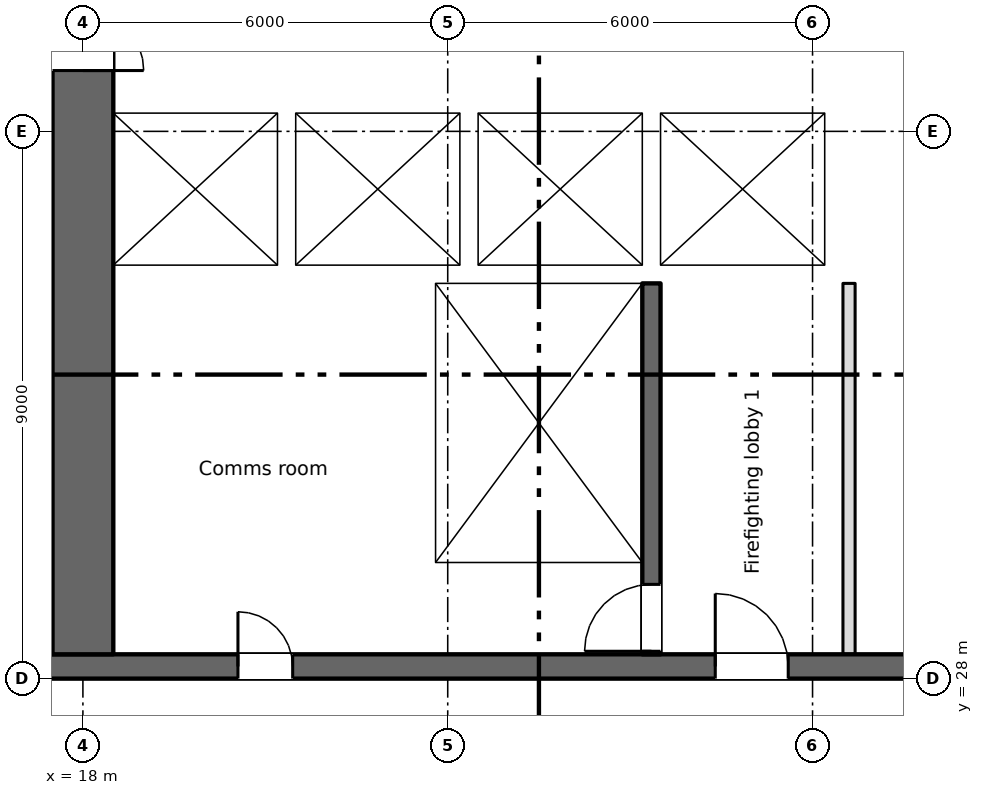
"""IFC4 building model, lengths in metres.
Left out: names, types, materials, properties, quantities, classifications, styles, units other than length and angle.
Written with IfcOpenShell. Run it as: python <this file> out.ifc"""

import sys

from ifc_helpers import new_model, si_unit, direction, frame, frame_2d, origin, place, context, subcontext, project, spatial, rectangle, extrude, element, fill, save


model = new_model("IFC4")
c1 = context("Model", 3, precision=1e-05, world=origin(), true_north=direction((0.0, 1.0)))
c2 = subcontext(c1, "Body", "Model", "MODEL_VIEW")
j1 = project(units=[si_unit("LENGTHUNIT", "METRE"), si_unit("PLANEANGLEUNIT", "RADIAN")], contexts=[c1])
p1 = place(None, origin())
s1 = spatial("IfcSite", under=j1, at=p1, CompositionType="ELEMENT")
p2 = place(p1, origin())
s2 = spatial("IfcBuilding", under=s1, at=p2, CompositionType="ELEMENT")
p3 = place(p2, frame((0.0, 0.0, 52.5)))
s3 = spatial("IfcBuildingStorey", under=s2, at=p3, CompositionType="ELEMENT", Elevation=52.5)
p4 = place(p3, frame((6.7, 28.2, 0.0), z_axis=(0.0, 0.0, 1.0), x_axis=(1.0, 0.0, 0.0)))
e1 = element("IfcWall", 1, at=p4, inside=s3, PredefinedType="SHEAR", context=c2, shape_type="SweptSolid", body=[
    extrude(rectangle(XDim=57.8, YDim=0.4, at=frame_2d((28.9, 0.0))), origin(), (0.0, 0.0, 1.0), 3.35),
])
p5 = place(p4, frame((13.85, 0.0, 0.0)))
e2 = element("IfcOpeningElement", 2, at=p5, cuts=e1, PredefinedType="OPENING", context=c2, shape_type="SweptSolid", body=[
    extrude(rectangle(XDim=0.9, YDim=2.1, at=frame_2d((0.45, 1.05))), frame((0.0, 0.21, 0.0), z_axis=(0.0, -1.0, 0.0), x_axis=(1.0, 0.0, 0.0)), (0.0, 0.0, 1.0), 0.42),
])
p6 = place(p4, frame((48.562, 0.0, 0.0)))
e3 = element("IfcOpeningElement", 3, at=p6, cuts=e1, PredefinedType="OPENING", context=c2, shape_type="SweptSolid", body=[
    extrude(rectangle(XDim=0.9, YDim=2.1, at=frame_2d((0.45, 1.05))), frame((0.0, 0.21, 0.0), z_axis=(0.0, -1.0, 0.0), x_axis=(1.0, 0.0, 0.0)), (0.0, 0.0, 1.0), 0.42),
])
p7 = place(p4, frame((51.137, 0.0, 0.0)))
e4 = element("IfcOpeningElement", 4, at=p7, cuts=e1, PredefinedType="OPENING", context=c2, shape_type="SweptSolid", body=[
    extrude(rectangle(XDim=0.9, YDim=2.1, at=frame_2d((0.45, 1.05))), frame((0.0, 0.21, 0.0), z_axis=(0.0, -1.0, 0.0), x_axis=(1.0, 0.0, 0.0)), (0.0, 0.0, 1.0), 0.42),
])
p8 = place(p4, frame((1.35, 0.0, 0.0)))
e5 = element("IfcOpeningElement", 5, at=p8, cuts=e1, PredefinedType="OPENING", context=c2, shape_type="SweptSolid", body=[
    extrude(rectangle(XDim=0.9, YDim=2.1, at=frame_2d((0.45, 1.05))), frame((0.0, 0.21, 0.0), z_axis=(0.0, -1.0, 0.0), x_axis=(1.0, 0.0, 0.0)), (0.0, 0.0, 1.0), 0.42),
])
p9 = place(p4, frame((4.7, 0.0, 0.0)))
e6 = element("IfcOpeningElement", 6, at=p9, cuts=e1, PredefinedType="OPENING", context=c2, shape_type="SweptSolid", body=[
    extrude(rectangle(XDim=1.2, YDim=2.1, at=frame_2d((0.6, 1.05))), frame((0.0, 0.21, 0.0), z_axis=(0.0, -1.0, 0.0), x_axis=(1.0, 0.0, 0.0)), (0.0, 0.0, 1.0), 0.42),
])
p10 = place(p4, frame((31.7, 0.0, 0.0)))
e7 = element("IfcOpeningElement", 7, at=p10, cuts=e1, PredefinedType="OPENING", context=c2, shape_type="SweptSolid", body=[
    extrude(rectangle(XDim=1.2, YDim=2.1, at=frame_2d((0.6, 1.05))), frame((0.0, 0.21, 0.0), z_axis=(0.0, -1.0, 0.0), x_axis=(1.0, 0.0, 0.0)), (0.0, 0.0, 1.0), 0.42),
])
p11 = place(p4, frame((55.2, 0.0, 0.0)))
e8 = element("IfcOpeningElement", 8, at=p11, cuts=e1, PredefinedType="OPENING", context=c2, shape_type="SweptSolid", body=[
    extrude(rectangle(XDim=1.2, YDim=2.1, at=frame_2d((0.6, 1.05))), frame((0.0, 0.21, 0.0), z_axis=(0.0, -1.0, 0.0), x_axis=(1.0, 0.0, 0.0)), (0.0, 0.0, 1.0), 0.42),
])
p12 = place(p4, frame((21.7, 0.0, 0.0)))
e9 = element("IfcOpeningElement", 9, at=p12, cuts=e1, PredefinedType="OPENING", context=c2, shape_type="SweptSolid", body=[
    extrude(rectangle(XDim=1.2, YDim=2.1, at=frame_2d((0.6, 1.05))), frame((0.0, 0.21, 0.0), z_axis=(0.0, -1.0, 0.0), x_axis=(1.0, 0.0, 0.0)), (0.0, 0.0, 1.0), 0.42),
])
p13 = place(p4, frame((41.7, 0.0, 0.0)))
e10 = element("IfcOpeningElement", 10, at=p13, cuts=e1, PredefinedType="OPENING", context=c2, shape_type="SweptSolid", body=[
    extrude(rectangle(XDim=1.2, YDim=2.1, at=frame_2d((0.6, 1.05))), frame((0.0, 0.21, 0.0), z_axis=(0.0, -1.0, 0.0), x_axis=(1.0, 0.0, 0.0)), (0.0, 0.0, 1.0), 0.42),
])
p14 = place(p4, frame((24.85, 0.0, 0.0)))
e11 = element("IfcOpeningElement", 11, at=p14, cuts=e1, PredefinedType="OPENING", context=c2, shape_type="SweptSolid", body=[
    extrude(rectangle(XDim=2.4, YDim=2.1, at=frame_2d((1.2, 1.05))), frame((0.0, 0.21, 0.0), z_axis=(0.0, -1.0, 0.0), x_axis=(1.0, 0.0, 0.0)), (0.0, 0.0, 1.0), 0.42),
])
p15 = place(p4, frame((37.35, 0.0, 0.0)))
e12 = element("IfcOpeningElement", 12, at=p15, cuts=e1, PredefinedType="OPENING", context=c2, shape_type="SweptSolid", body=[
    extrude(rectangle(XDim=2.4, YDim=2.1, at=frame_2d((1.2, 1.05))), frame((0.0, 0.21, 0.0), z_axis=(0.0, -1.0, 0.0), x_axis=(1.0, 0.0, 0.0)), (0.0, 0.0, 1.0), 0.42),
])
p16 = place(p4, frame((7.85, 0.0, 0.0)))
e13 = element("IfcOpeningElement", 13, at=p16, cuts=e1, PredefinedType="OPENING", context=c2, shape_type="SweptSolid", body=[
    extrude(rectangle(XDim=2.4, YDim=2.1, at=frame_2d((1.2, 1.05))), frame((0.0, 0.21, 0.0), z_axis=(0.0, -1.0, 0.0), x_axis=(1.0, 0.0, 0.0)), (0.0, 0.0, 1.0), 0.42),
])
p17 = place(p4, frame((28.85, 0.0, 0.0)))
e14 = element("IfcOpeningElement", 14, at=p17, cuts=e1, PredefinedType="OPENING", context=c2, shape_type="SweptSolid", body=[
    extrude(rectangle(XDim=0.9, YDim=2.1, at=frame_2d((0.45, 1.05))), frame((0.0, 0.21, 0.0), z_axis=(0.0, -1.0, 0.0), x_axis=(1.0, 0.0, 0.0)), (0.0, 0.0, 1.0), 0.42),
])
p18 = place(p4, frame((34.85, 0.0, 0.0)))
e15 = element("IfcOpeningElement", 15, at=p18, cuts=e1, PredefinedType="OPENING", context=c2, shape_type="SweptSolid", body=[
    extrude(rectangle(XDim=0.9, YDim=2.1, at=frame_2d((0.45, 1.05))), frame((0.0, 0.21, 0.0), z_axis=(0.0, -1.0, 0.0), x_axis=(1.0, 0.0, 0.0)), (0.0, 0.0, 1.0), 0.42),
])
p19 = place(p3, frame((18.0, 28.4, 0.0), z_axis=(0.0, 0.0, 1.0), x_axis=(0.0, 1.0, 0.0)))
e16 = element("IfcWall", 16, at=p19, inside=s3, PredefinedType="SHEAR", context=c2, shape_type="SweptSolid", body=[
    extrude(rectangle(XDim=16.6, YDim=1.0, at=frame_2d((8.3, 0.0))), origin(), (0.0, 0.0, 1.0), 3.35),
])
p20 = place(p19, frame((9.6, 0.0, 0.0)))
e17 = element("IfcOpeningElement", 17, at=p20, cuts=e16, PredefinedType="OPENING", context=c2, shape_type="SweptSolid", body=[
    extrude(rectangle(XDim=2.0, YDim=2.1, at=frame_2d((1.0, 1.05))), frame((0.0, 0.51, 0.0), z_axis=(0.0, -1.0, 0.0), x_axis=(1.0, 0.0, 0.0)), (0.0, 0.0, 1.0), 1.02),
])
p21 = place(p19, frame((15.25, 0.0, 0.0)))
e18 = element("IfcOpeningElement", 18, at=p21, cuts=e16, PredefinedType="OPENING", context=c2, shape_type="SweptSolid", body=[
    extrude(rectangle(XDim=1.2, YDim=2.1, at=frame_2d((0.6, 1.05))), frame((0.0, 0.51, 0.0), z_axis=(0.0, -1.0, 0.0), x_axis=(1.0, 0.0, 0.0)), (0.0, 0.0, 1.0), 1.02),
])
p22 = place(p3, frame((23.65, 28.4, 0.0), z_axis=(0.0, 0.0, 1.0), x_axis=(0.0, 1.0, 0.0)))
e19 = element("IfcWall", 19, at=p22, inside=s3, PredefinedType="SHEAR", context=c2, shape_type="SweptSolid", body=[
    extrude(rectangle(XDim=6.1, YDim=0.3, at=frame_2d((3.05, 0.0))), origin(), (0.0, 0.0, 1.0), 3.35),
])
p23 = place(p3, frame((27.35, 28.4, 0.0), z_axis=(0.0, 0.0, 1.0), x_axis=(0.0, 1.0, 0.0)))
e20 = element("IfcWall", 20, at=p23, inside=s3, PredefinedType="SHEAR", context=c2, shape_type="SweptSolid", body=[
    extrude(rectangle(XDim=6.1, YDim=0.3, at=frame_2d((3.05, 0.0))), origin(), (0.0, 0.0, 1.0), 3.35),
])
p24 = place(p23, frame((0.05, 0.0, 0.0)))
e21 = element("IfcOpeningElement", 21, at=p24, cuts=e20, PredefinedType="OPENING", context=c2, shape_type="SweptSolid", body=[
    extrude(rectangle(XDim=1.1, YDim=2.1, at=frame_2d((0.55, 1.05))), frame((0.0, 0.16, 0.0), z_axis=(0.0, -1.0, 0.0), x_axis=(1.0, 0.0, 0.0)), (0.0, 0.0, 1.0), 0.32),
])
p25 = place(p3, frame((18.5, 34.65, 0.0), z_axis=(0.0, 0.0, 1.0), x_axis=(1.0, 0.0, 0.0)))
e22 = element("IfcWall", 22, at=p25, inside=s3, PredefinedType="SHEAR", context=c2, shape_type="SweptSolid", body=[
    extrude(rectangle(XDim=12.2, YDim=0.3, at=frame_2d((6.1, 0.0))), origin(), (0.0, 0.0, 1.0), 3.35),
])
p26 = place(p25, frame((9.8, 0.0, 0.0)))
e23 = element("IfcOpeningElement", 23, at=p26, cuts=e22, PredefinedType="OPENING", context=c2, shape_type="SweptSolid", body=[
    extrude(rectangle(XDim=1.1, YDim=2.1, at=frame_2d((0.55, 1.05))), frame((0.0, 0.16, 0.0), z_axis=(0.0, -1.0, 0.0), x_axis=(1.0, 0.0, 0.0)), (0.0, 0.0, 1.0), 0.32),
])
p27 = place(p3, frame((18.5, 37.45, 0.0), z_axis=(0.0, 0.0, 1.0), x_axis=(1.0, 0.0, 0.0)))
e24 = element("IfcWall", 24, at=p27, inside=s3, PredefinedType="SHEAR", context=c2, shape_type="SweptSolid", body=[
    extrude(rectangle(XDim=12.2, YDim=0.3, at=frame_2d((6.1, 0.0))), origin(), (0.0, 0.0, 1.0), 3.35),
])
p28 = place(p27, frame((0.8, 0.0, 0.0)))
e25 = element("IfcOpeningElement", 25, at=p28, cuts=e24, PredefinedType="OPENING", context=c2, shape_type="SweptSolid", body=[
    extrude(rectangle(XDim=1.1, YDim=2.1, at=frame_2d((0.55, 1.05))), frame((0.0, 0.16, 0.0), z_axis=(0.0, -1.0, 0.0), x_axis=(1.0, 0.0, 0.0)), (0.0, 0.0, 1.0), 0.32),
])
p29 = place(p27, frame((3.8, 0.0, 0.0)))
e26 = element("IfcOpeningElement", 26, at=p29, cuts=e24, PredefinedType="OPENING", context=c2, shape_type="SweptSolid", body=[
    extrude(rectangle(XDim=1.1, YDim=2.1, at=frame_2d((0.55, 1.05))), frame((0.0, 0.16, 0.0), z_axis=(0.0, -1.0, 0.0), x_axis=(1.0, 0.0, 0.0)), (0.0, 0.0, 1.0), 0.32),
])
p30 = place(p27, frame((6.8, 0.0, 0.0)))
e27 = element("IfcOpeningElement", 27, at=p30, cuts=e24, PredefinedType="OPENING", context=c2, shape_type="SweptSolid", body=[
    extrude(rectangle(XDim=1.1, YDim=2.1, at=frame_2d((0.55, 1.05))), frame((0.0, 0.16, 0.0), z_axis=(0.0, -1.0, 0.0), x_axis=(1.0, 0.0, 0.0)), (0.0, 0.0, 1.0), 0.32),
])
p31 = place(p3, frame((27.35, 34.8, 0.0), z_axis=(0.0, 0.0, 1.0), x_axis=(0.0, 1.0, 0.0)))
e28 = element("IfcWall", 28, at=p31, inside=s3, PredefinedType="SHEAR", context=c2, shape_type="SweptSolid", body=[
    extrude(rectangle(XDim=2.5, YDim=0.3, at=frame_2d((1.25, 0.0))), origin(), (0.0, 0.0, 1.0), 3.35),
])
p32 = place(p3, frame((30.45, 34.8, 0.0), z_axis=(0.0, 0.0, 1.0), x_axis=(0.0, 1.0, 0.0)))
e29 = element("IfcWall", 29, at=p32, inside=s3, PredefinedType="SHEAR", context=c2, shape_type="SweptSolid", body=[
    extrude(rectangle(XDim=2.5, YDim=0.5, at=frame_2d((1.25, 0.0))), origin(), (0.0, 0.0, 1.0), 3.35),
])
for number, where, z_axis, x_axis in (
    (30, (21.35, 34.8, 0.0), (0.0, 0.0, 1.0), (0.0, 1.0, 0.0)),
    (31, (24.35, 34.8, 0.0), (0.0, 0.0, 1.0), (0.0, 1.0, 0.0)),
):
    element("IfcWall", number, at=place(p3, frame(where, z_axis=z_axis, x_axis=x_axis)), inside=s3, PredefinedType="SHEAR", context=c2, shape_type="SweptSolid", body=[
        extrude(rectangle(XDim=2.5, YDim=0.3, at=frame_2d((1.25, 0.0))), origin(), (0.0, 0.0, 1.0), 3.35),
    ])
p33 = place(p3, frame((30.6, 28.4, 0.0), z_axis=(0.0, 0.0, 1.0), x_axis=(0.0, 1.0, 0.0)))
e32 = element("IfcWall", 32, at=p33, inside=s3, PredefinedType="PARTITIONING", context=c2, shape_type="SweptSolid", body=[
    extrude(rectangle(XDim=6.1, YDim=0.2, at=frame_2d((3.05, 0.0))), origin(), (0.0, 0.0, 1.0), 3.35),
])
p34 = place(p5, origin())
e33 = element("IfcDoor", 33, at=p34, inside=s3, OperationType="SINGLE_SWING_LEFT", PredefinedType="DOOR", context=c2, shape_type="SweptSolid", body=[
    extrude(rectangle(XDim=0.9, YDim=2.1, at=frame_2d((0.45, 1.05))), frame((0.0, 0.025, 0.0), z_axis=(0.0, -1.0, 0.0), x_axis=(1.0, 0.0, 0.0)), (0.0, 0.0, 1.0), 0.05),
])
fill(e2, e33)
p35 = place(p28, origin())
e34 = element("IfcDoor", 34, at=p35, inside=s3, OperationType="SLIDING_TO_LEFT", PredefinedType="DOOR", context=c2, shape_type="SweptSolid", body=[
    extrude(rectangle(XDim=1.1, YDim=2.1, at=frame_2d((0.55, 1.05))), frame((0.0, 0.025, 0.0), z_axis=(0.0, -1.0, 0.0), x_axis=(1.0, 0.0, 0.0)), (0.0, 0.0, 1.0), 0.05),
])
fill(e25, e34)
p36 = place(p29, origin())
e35 = element("IfcDoor", 35, at=p36, inside=s3, OperationType="SLIDING_TO_LEFT", PredefinedType="DOOR", context=c2, shape_type="SweptSolid", body=[
    extrude(rectangle(XDim=1.1, YDim=2.1, at=frame_2d((0.55, 1.05))), frame((0.0, 0.025, 0.0), z_axis=(0.0, -1.0, 0.0), x_axis=(1.0, 0.0, 0.0)), (0.0, 0.0, 1.0), 0.05),
])
fill(e26, e35)
p37 = place(p30, origin())
e36 = element("IfcDoor", 36, at=p37, inside=s3, OperationType="SLIDING_TO_LEFT", PredefinedType="DOOR", context=c2, shape_type="SweptSolid", body=[
    extrude(rectangle(XDim=1.1, YDim=2.1, at=frame_2d((0.55, 1.05))), frame((0.0, 0.025, 0.0), z_axis=(0.0, -1.0, 0.0), x_axis=(1.0, 0.0, 0.0)), (0.0, 0.0, 1.0), 0.05),
])
fill(e27, e36)
p38 = place(p26, origin())
e37 = element("IfcDoor", 37, at=p38, inside=s3, OperationType="SLIDING_TO_LEFT", PredefinedType="DOOR", context=c2, shape_type="SweptSolid", body=[
    extrude(rectangle(XDim=1.1, YDim=2.1, at=frame_2d((0.55, 1.05))), frame((0.0, 0.025, 0.0), z_axis=(0.0, -1.0, 0.0), x_axis=(1.0, 0.0, 0.0)), (0.0, 0.0, 1.0), 0.05),
])
fill(e23, e37)
p39 = place(p24, origin())
e38 = element("IfcDoor", 38, at=p39, inside=s3, OperationType="SINGLE_SWING_LEFT", PredefinedType="DOOR", context=c2, shape_type="SweptSolid", body=[
    extrude(rectangle(XDim=1.1, YDim=2.1, at=frame_2d((0.55, 1.05))), frame((0.0, 0.025, 0.0), z_axis=(0.0, -1.0, 0.0), x_axis=(1.0, 0.0, 0.0)), (0.0, 0.0, 1.0), 0.05),
])
fill(e21, e38)
p40 = place(p12, origin())
e39 = element("IfcDoor", 39, at=p40, inside=s3, OperationType="SINGLE_SWING_LEFT", PredefinedType="DOOR", context=c2, shape_type="SweptSolid", body=[
    extrude(rectangle(XDim=1.2, YDim=2.1, at=frame_2d((0.6, 1.05))), frame((0.0, 0.025, 0.0), z_axis=(0.0, -1.0, 0.0), x_axis=(1.0, 0.0, 0.0)), (0.0, 0.0, 1.0), 0.05),
])
fill(e9, e39)
p41 = place(p20, origin())
e40 = element("IfcDoor", 40, at=p41, inside=s3, OperationType="DOUBLE_DOOR_SINGLE_SWING", PredefinedType="DOOR", context=c2, shape_type="SweptSolid", body=[
    extrude(rectangle(XDim=2.0, YDim=2.1, at=frame_2d((1.0, 1.05))), frame((0.0, 0.025, 0.0), z_axis=(0.0, -1.0, 0.0), x_axis=(1.0, 0.0, 0.0)), (0.0, 0.0, 1.0), 0.05),
])
fill(e17, e40)
save(model, sys.argv[1])
